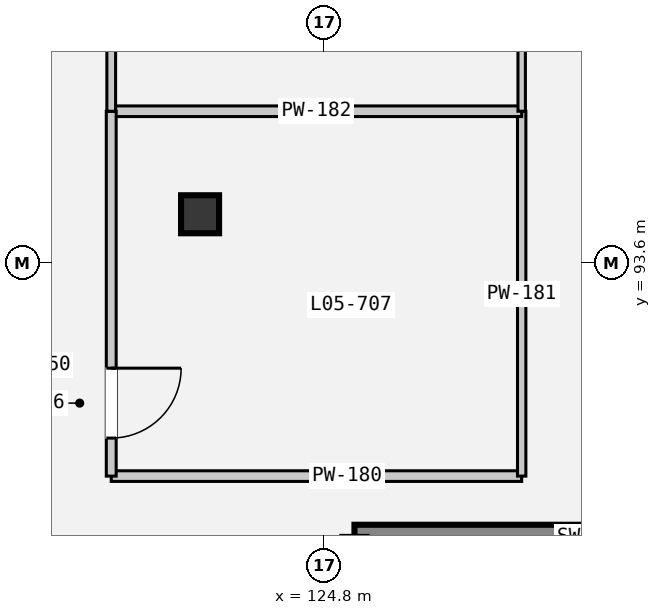
"""IFC4 building model, lengths in metres.
Left out: names, types, materials, properties, quantities, classifications, styles, units other than length and angle.
Written with IfcOpenShell. Run it as: python <this file> out.ifc"""

import sys

from ifc_helpers import new_model, si_unit, direction, frame, frame_2d, origin, origin_2d, place, context, subcontext, project, spatial, rectangle, extrude, element, fill, save


model = new_model("IFC4")
c1 = context("Model", 3, precision=1e-05, world=origin(), true_north=direction((0.0, 1.0)))
c2 = subcontext(c1, "Body", "Model", "MODEL_VIEW")
j1 = project(units=[si_unit("LENGTHUNIT", "METRE"), si_unit("PLANEANGLEUNIT", "RADIAN")], contexts=[c1])
p1 = place(None, origin())
s1 = spatial("IfcSite", under=j1, at=p1, CompositionType="ELEMENT")
p2 = place(p1, origin())
s2 = spatial("IfcBuilding", under=s1, at=p2, CompositionType="ELEMENT")
p3 = place(p2, frame((0.0, 0.0, 24.3)))
s3 = spatial("IfcBuildingStorey", under=s2, at=p3, CompositionType="ELEMENT", Elevation=24.3)
p4 = place(p3, frame((123.169, 94.245, 0.0), z_axis=(0.0, 0.0, 1.0), x_axis=(1.0, 0.0, 0.0)))
e1 = element("IfcColumn", 1, at=p4, inside=s3, PredefinedType="COLUMN", context=c2, shape_type="SweptSolid", body=[
    extrude(rectangle(XDim=0.5, YDim=0.5, at=origin_2d()), origin(), (0.0, 0.0, 1.0), 4.5),
])
p5 = place(p3, frame((125.2, 90.0, 0.0), z_axis=(0.0, 0.0, 1.0), x_axis=(1.0, 0.0, 0.0)))
e2 = element("IfcWall", 2, at=p5, inside=s3, PredefinedType="SHEAR", context=c2, shape_type="SweptSolid", body=[
    extrude(rectangle(XDim=6.4, YDim=0.32, at=frame_2d((3.2, 0.0))), origin(), (0.0, 0.0, 1.0), 4.5),
])
p6 = place(p3, frame((122.0, 90.8, 0.0), z_axis=(0.0, 0.0, 1.0), x_axis=(1.0, 0.0, 0.0)))
e3 = element("IfcWall", 3, at=p6, inside=s3, PredefinedType="PARTITIONING", context=c2, shape_type="SweptSolid", body=[
    extrude(rectangle(XDim=5.4, YDim=0.14, at=frame_2d((2.7, 0.0))), origin(), (0.0, 0.0, 1.0), 3.45),
])
p7 = place(p3, frame((127.4, 90.8, 0.0), z_axis=(0.0, 0.0, 1.0), x_axis=(0.0, 1.0, 0.0)))
e4 = element("IfcWall", 4, at=p7, inside=s3, PredefinedType="PARTITIONING", context=c2, shape_type="SweptSolid", body=[
    extrude(rectangle(XDim=4.8, YDim=0.11, at=frame_2d((2.4, 0.0))), origin(), (0.0, 0.0, 1.0), 3.45),
])
p8 = place(p3, frame((127.4, 95.6, 0.0), z_axis=(0.0, 0.0, 1.0), x_axis=(-1.0, 0.0, 0.0)))
e5 = element("IfcWall", 5, at=p8, inside=s3, PredefinedType="PARTITIONING", context=c2, shape_type="SweptSolid", body=[
    extrude(rectangle(XDim=5.4, YDim=0.14, at=frame_2d((2.7, 0.0))), origin(), (0.0, 0.0, 1.0), 3.45),
])
p9 = place(p3, frame((122.0, 95.6, 0.0), z_axis=(0.0, 0.0, 1.0), x_axis=(0.0, -1.0, 0.0)))
e6 = element("IfcWall", 6, at=p9, inside=s3, PredefinedType="PARTITIONING", context=c2, shape_type="SweptSolid", body=[
    extrude(rectangle(XDim=4.8, YDim=0.13, at=frame_2d((2.4, 0.0))), origin(), (0.0, 0.0, 1.0), 3.45),
])
p10 = place(p9, frame((3.38, 0.0, 0.0)))
e7 = element("IfcOpeningElement", 7, at=p10, cuts=e6, PredefinedType="OPENING", context=c2, shape_type="SweptSolid", body=[
    extrude(rectangle(XDim=0.92, YDim=2.1, at=frame_2d((0.46, 1.05))), frame((0.0, 0.075, 0.0), z_axis=(0.0, -1.0, 0.0), x_axis=(1.0, 0.0, 0.0)), (0.0, 0.0, 1.0), 0.15),
])
p11 = place(p3, frame((127.4, 95.6, 0.0), z_axis=(0.0, 0.0, 1.0), x_axis=(0.0, 1.0, 0.0)))
e8 = element("IfcWall", 8, at=p11, inside=s3, PredefinedType="PARTITIONING", context=c2, shape_type="SweptSolid", body=[
    extrude(rectangle(XDim=3.4, YDim=0.098, at=frame_2d((1.7, 0.0))), origin(), (0.0, 0.0, 1.0), 3.45),
])
p12 = place(p3, frame((122.0, 99.0, 0.0), z_axis=(0.0, 0.0, 1.0), x_axis=(0.0, -1.0, 0.0)))
e9 = element("IfcWall", 9, at=p12, inside=s3, PredefinedType="PARTITIONING", context=c2, shape_type="SweptSolid", body=[
    extrude(rectangle(XDim=3.4, YDim=0.115, at=frame_2d((1.7, 0.0))), origin(), (0.0, 0.0, 1.0), 3.45),
])
p13 = place(p12, frame((1.121, 0.0, 0.0)))
e10 = element("IfcOpeningElement", 10, at=p13, cuts=e9, PredefinedType="OPENING", context=c2, shape_type="SweptSolid", body=[
    extrude(rectangle(XDim=0.95, YDim=2.1, at=frame_2d((0.475, 1.05))), frame((0.0, 0.067, 0.0), z_axis=(0.0, -1.0, 0.0), x_axis=(1.0, 0.0, 0.0)), (0.0, 0.0, 1.0), 0.135),
])
p14 = place(p10, origin())
e11 = element("IfcDoor", 11, at=p14, inside=s3, OperationType="SINGLE_SWING_LEFT", PredefinedType="DOOR", context=c2, shape_type="SweptSolid", body=[
    extrude(rectangle(XDim=0.92, YDim=2.1, at=frame_2d((0.46, 1.05))), frame((0.0, 0.025, 0.0), z_axis=(0.0, -1.0, 0.0), x_axis=(1.0, 0.0, 0.0)), (0.0, 0.0, 1.0), 0.05),
])
fill(e7, e11)
save(model, sys.argv[1])
